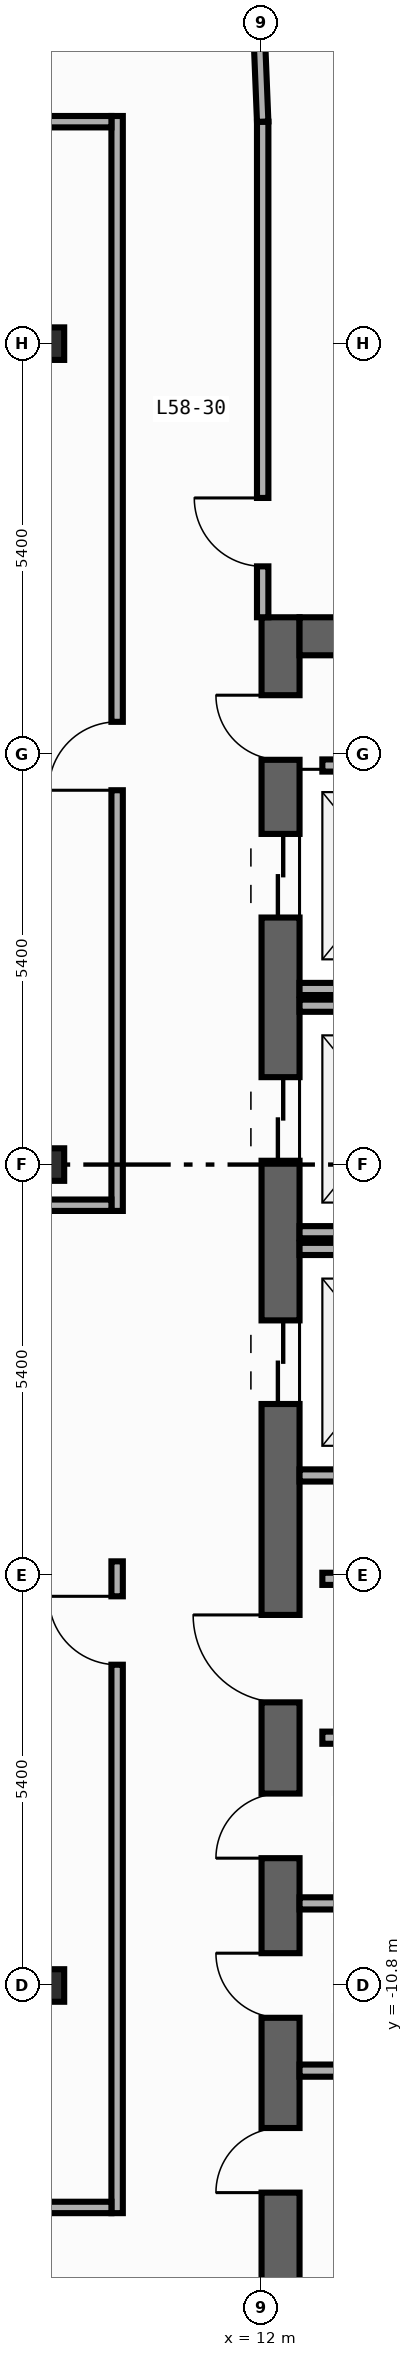
"""IFC4 building model, lengths in metres.
Left out: names, types, materials, properties, quantities, classifications, styles, units other than length and angle.
Written with IfcOpenShell. Run it as: python <this file> out.ifc"""

import sys

from ifc_helpers import new_model, si_unit, direction, frame, frame_2d, origin, origin_2d, place, context, subcontext, project, spatial, rectangle, i_section, extrude, element, fill, save


model = new_model("IFC4")
c1 = context("Model", 3, precision=1e-05, world=origin(), true_north=direction((0.0, 1.0)))
c2 = subcontext(c1, "Body", "Model", "MODEL_VIEW")
j1 = project(units=[si_unit("LENGTHUNIT", "METRE"), si_unit("PLANEANGLEUNIT", "RADIAN")], contexts=[c1])
p1 = place(None, origin())
s1 = spatial("IfcSite", under=j1, at=p1, CompositionType="ELEMENT")
p2 = place(p1, origin())
s2 = spatial("IfcBuilding", under=s1, at=p2, CompositionType="ELEMENT")
p3 = place(p2, frame((0.0, 0.0, 247.6)))
s3 = spatial("IfcBuildingStorey", under=s2, at=p3, CompositionType="ELEMENT", Elevation=247.6)
p4 = place(p3, frame((12.25, -19.8, 0.0), z_axis=(0.0, 0.0, 1.0), x_axis=(0.0, 1.0, 0.0)))
e1 = element("IfcWall", 1, at=p4, inside=s3, PredefinedType="SHEAR", context=c2, shape_type="SweptSolid", body=[
    extrude(rectangle(XDim=27.0, YDim=0.5, at=frame_2d((13.5, 0.0))), origin(), (0.0, 0.0, 1.0), 3.34),
])
p5 = place(p4, frame((23.05, 0.0, 0.0)))
e2 = element("IfcOpeningElement", 2, at=p5, cuts=e1, PredefinedType="OPENING", context=c2, shape_type="SweptSolid", body=[
    extrude(rectangle(XDim=1.1, YDim=2.2, at=frame_2d((0.55, 1.1))), frame((0.0, 0.26, 0.0), z_axis=(0.0, -1.0, 0.0), x_axis=(1.0, 0.0, 0.0)), (0.0, 0.0, 1.0), 0.52),
])
p6 = place(p4, frame((19.85, 0.0, 0.0)))
e3 = element("IfcOpeningElement", 3, at=p6, cuts=e1, PredefinedType="OPENING", context=c2, shape_type="SweptSolid", body=[
    extrude(rectangle(XDim=1.1, YDim=2.2, at=frame_2d((0.55, 1.1))), frame((0.0, 0.26, 0.0), z_axis=(0.0, -1.0, 0.0), x_axis=(1.0, 0.0, 0.0)), (0.0, 0.0, 1.0), 0.52),
])
p7 = place(p4, frame((16.65, 0.0, 0.0)))
e4 = element("IfcOpeningElement", 4, at=p7, cuts=e1, PredefinedType="OPENING", context=c2, shape_type="SweptSolid", body=[
    extrude(rectangle(XDim=1.1, YDim=2.2, at=frame_2d((0.55, 1.1))), frame((0.0, 0.26, 0.0), z_axis=(0.0, -1.0, 0.0), x_axis=(1.0, 0.0, 0.0)), (0.0, 0.0, 1.0), 0.52),
])
p8 = place(p4, frame((6.275, 0.0, 0.0)))
e5 = element("IfcOpeningElement", 5, at=p8, cuts=e1, PredefinedType="OPENING", context=c2, shape_type="SweptSolid", body=[
    extrude(rectangle(XDim=0.85, YDim=2.1, at=frame_2d((0.425, 1.05))), frame((0.0, 0.26, 0.0), z_axis=(0.0, -1.0, 0.0), x_axis=(1.0, 0.0, 0.0)), (0.0, 0.0, 1.0), 0.52),
])
p9 = place(p4, frame((8.575, 0.0, 0.0)))
e6 = element("IfcOpeningElement", 6, at=p9, cuts=e1, PredefinedType="OPENING", context=c2, shape_type="SweptSolid", body=[
    extrude(rectangle(XDim=0.85, YDim=2.1, at=frame_2d((0.425, 1.05))), frame((0.0, 0.26, 0.0), z_axis=(0.0, -1.0, 0.0), x_axis=(1.0, 0.0, 0.0)), (0.0, 0.0, 1.0), 0.52),
])
p10 = place(p4, frame((10.675, 0.0, 0.0)))
e7 = element("IfcOpeningElement", 7, at=p10, cuts=e1, PredefinedType="OPENING", context=c2, shape_type="SweptSolid", body=[
    extrude(rectangle(XDim=0.85, YDim=2.1, at=frame_2d((0.425, 1.05))), frame((0.0, 0.26, 0.0), z_axis=(0.0, -1.0, 0.0), x_axis=(1.0, 0.0, 0.0)), (0.0, 0.0, 1.0), 0.52),
])
p11 = place(p4, frame((12.725, 0.0, 0.0)))
e8 = element("IfcOpeningElement", 8, at=p11, cuts=e1, PredefinedType="OPENING", context=c2, shape_type="SweptSolid", body=[
    extrude(rectangle(XDim=1.15, YDim=2.2, at=frame_2d((0.575, 1.1))), frame((0.0, 0.26, 0.0), z_axis=(0.0, -1.0, 0.0), x_axis=(1.0, 0.0, 0.0)), (0.0, 0.0, 1.0), 0.52),
])
p12 = place(p4, frame((25.125, 0.0, 0.0)))
e9 = element("IfcOpeningElement", 9, at=p12, cuts=e1, PredefinedType="OPENING", context=c2, shape_type="SweptSolid", body=[
    extrude(rectangle(XDim=0.85, YDim=2.1, at=frame_2d((0.425, 1.05))), frame((0.0, 0.26, 0.0), z_axis=(0.0, -1.0, 0.0), x_axis=(1.0, 0.0, 0.0)), (0.0, 0.0, 1.0), 0.52),
])
p13 = place(p3, frame((12.5, 6.95, 0.0), z_axis=(0.0, 0.0, 1.0), x_axis=(1.0, 0.0, 0.0)))
e10 = element("IfcWall", 10, at=p13, inside=s3, PredefinedType="SHEAR", context=c2, shape_type="SweptSolid", body=[
    extrude(rectangle(XDim=7.4, YDim=0.5, at=frame_2d((3.7, 0.0))), origin(), (0.0, 0.0, 1.0), 3.34),
])
for number, where, z_axis, x_axis in (
    (11, (9.2, -10.8, 0.0), (0.0, 0.0, 1.0), (1.0, 0.0, 0.0)),
    (12, (9.2, 0.0, 0.0), (0.0, 0.0, 1.0), (1.0, 0.0, 0.0)),
    (13, (9.2, 10.8, 0.0), (0.0, 0.0, 1.0), (1.0, 0.0, 0.0)),
):
    element("IfcColumn", number, at=place(p3, frame(where, z_axis=z_axis, x_axis=x_axis)), inside=s3, PredefinedType="COLUMN", context=c2, shape_type="SweptSolid", body=[
        extrude(i_section(OverallWidth=0.407, OverallDepth=0.428, WebThickness=0.02, FlangeThickness=0.035, FilletRadius=0.022, at=origin_2d()), origin(), (0.0, 0.0, 1.0), 3.6),
    ])
for number, where, z_axis, x_axis in (
    (14, (12.5, 2.31, 0.0), (0.0, 0.0, 1.0), (1.0, 0.0, 0.0)),
    (15, (12.5, -0.89, 0.0), (0.0, 0.0, 1.0), (1.0, 0.0, 0.0)),
    (16, (12.5, 2.09, 0.0), (0.0, 0.0, 1.0), (1.0, 0.0, 0.0)),
    (17, (12.5, -4.09, 0.0), (0.0, 0.0, 1.0), (1.0, 0.0, 0.0)),
    (18, (12.5, -1.11, 0.0), (0.0, 0.0, 1.0), (1.0, 0.0, 0.0)),
):
    element("IfcWall", number, at=place(p3, frame(where, z_axis=z_axis, x_axis=x_axis)), inside=s3, PredefinedType="STANDARD", context=c2, shape_type="SweptSolid", body=[
        extrude(rectangle(XDim=2.49, YDim=0.16, at=frame_2d((1.245, 0.0))), origin(), (0.0, 0.0, 1.0), 3.34),
    ])
for number, where, z_axis, x_axis in (
    (19, (12.8, -5.45, 0.0), (0.0, 0.0, 1.0), (1.0, 0.0, 0.0)),
    (20, (12.8, -7.54, 0.0), (0.0, 0.0, 1.0), (1.0, 0.0, 0.0)),
    (21, (12.8, 5.25, 0.0), (0.0, 0.0, 1.0), (1.0, 0.0, 0.0)),
):
    element("IfcWall", number, at=place(p3, frame(where, z_axis=z_axis, x_axis=x_axis)), inside=s3, PredefinedType="STANDARD", context=c2, shape_type="SweptSolid", body=[
        extrude(rectangle(XDim=2.6, YDim=0.16, at=frame_2d((1.3, 0.0))), origin(), (0.0, 0.0, 1.0), 3.34),
    ])
for number, where, z_axis, x_axis in (
    (22, (12.5, -11.92, 0.0), (0.0, 0.0, 1.0), (1.0, 0.0, 0.0)),
    (23, (12.5, -9.72, 0.0), (0.0, 0.0, 1.0), (1.0, 0.0, 0.0)),
):
    element("IfcWall", number, at=place(p3, frame(where, z_axis=z_axis, x_axis=x_axis)), inside=s3, PredefinedType="PARTITIONING", context=c2, shape_type="SweptSolid", body=[
        extrude(rectangle(XDim=2.9, YDim=0.16, at=frame_2d((1.45, 0.0))), origin(), (0.0, 0.0, 1.0), 3.34),
    ])
p14 = place(p3, frame((12.015, 7.2, 0.0), z_axis=(0.0, 0.0, 1.0), x_axis=(0.0, 1.0, 0.0)))
e24 = element("IfcWall", 24, at=p14, inside=s3, PredefinedType="PARTITIONING", context=c2, shape_type="SweptSolid", body=[
    extrude(rectangle(XDim=6.52, YDim=0.15, at=frame_2d((3.26, 0.0))), origin(), (0.0, 0.0, 1.0), 3.34),
])
p15 = place(p14, frame((0.67, 0.0, 0.0)))
e25 = element("IfcOpeningElement", 25, at=p15, cuts=e24, PredefinedType="OPENING", context=c2, shape_type="SweptSolid", body=[
    extrude(rectangle(XDim=0.9, YDim=2.15, at=frame_2d((0.45, 1.075))), frame((0.0, 0.085, 0.0), z_axis=(0.0, -1.0, 0.0), x_axis=(1.0, 0.0, 0.0)), (0.0, 0.0, 1.0), 0.17),
])
p16 = place(p3, frame((10.1, -0.61, 0.0), z_axis=(0.0, 0.0, 1.0), x_axis=(0.0, 1.0, 0.0)))
e26 = element("IfcWall", 26, at=p16, inside=s3, PredefinedType="PARTITIONING", context=c2, shape_type="SweptSolid", body=[
    extrude(rectangle(XDim=14.405, YDim=0.15, at=frame_2d((7.203, 0.0))), origin(), (0.0, 0.0, 1.0), 3.34),
])
p17 = place(p16, frame((5.535, 0.0, 0.0)))
e27 = element("IfcOpeningElement", 27, at=p17, cuts=e26, PredefinedType="OPENING", context=c2, shape_type="SweptSolid", body=[
    extrude(rectangle(XDim=0.9, YDim=2.15, at=frame_2d((0.45, 1.075))), frame((0.0, 0.085, 0.0), z_axis=(0.0, -1.0, 0.0), x_axis=(1.0, 0.0, 0.0)), (0.0, 0.0, 1.0), 0.17),
])
p18 = place(p3, frame((10.1, -13.795, 0.0), z_axis=(0.0, 0.0, 1.0), x_axis=(0.0, 1.0, 0.0)))
e28 = element("IfcWall", 28, at=p18, inside=s3, PredefinedType="PARTITIONING", context=c2, shape_type="SweptSolid", body=[
    extrude(rectangle(XDim=8.575, YDim=0.15, at=frame_2d((4.288, 0.0))), origin(), (0.0, 0.0, 1.0), 3.34),
])
p19 = place(p18, frame((7.215, 0.0, 0.0)))
e29 = element("IfcOpeningElement", 29, at=p19, cuts=e28, PredefinedType="OPENING", context=c2, shape_type="SweptSolid", body=[
    extrude(rectangle(XDim=0.9, YDim=2.15, at=frame_2d((0.45, 1.075))), frame((0.0, 0.085, 0.0), z_axis=(0.0, -1.0, 0.0), x_axis=(1.0, 0.0, 0.0)), (0.0, 0.0, 1.0), 0.17),
])
p20 = place(p3, frame((-0.21, -0.535, 0.0), z_axis=(0.0, 0.0, 1.0), x_axis=(1.0, 0.0, 0.0)))
e30 = element("IfcWall", 30, at=p20, inside=s3, PredefinedType="PARTITIONING", context=c2, shape_type="SweptSolid", body=[
    extrude(rectangle(XDim=10.235, YDim=0.15, at=frame_2d((5.117, 0.0))), origin(), (0.0, 0.0, 1.0), 3.34),
])
p21 = place(p20, frame((0.46, 0.0, 0.0)))
e31 = element("IfcOpeningElement", 31, at=p21, cuts=e30, PredefinedType="OPENING", context=c2, shape_type="SweptSolid", body=[
    extrude(rectangle(XDim=0.9, YDim=2.15, at=frame_2d((0.45, 1.075))), frame((0.0, 0.085, 0.0), z_axis=(0.0, -1.0, 0.0), x_axis=(1.0, 0.0, 0.0)), (0.0, 0.0, 1.0), 0.17),
])
p22 = place(p3, frame((12.015, 13.72, 0.0), z_axis=(0.0, 0.0, 1.0), x_axis=(-0.040046877756, 0.99919780203, 0.0)))
e32 = element("IfcWall", 32, at=p22, inside=s3, PredefinedType="PARTITIONING", context=c2, shape_type="SweptSolid", body=[
    extrude(rectangle(XDim=1.731, YDim=0.15, at=frame_2d((0.866, 0.0))), origin(), (0.0, 0.0, 1.0), 3.34),
])
p23 = place(p3, frame((-0.06, 13.72, 0.0), z_axis=(0.0, 0.0, 1.0), x_axis=(1.0, 0.0, 0.0)))
e33 = element("IfcWall", 33, at=p23, inside=s3, PredefinedType="PARTITIONING", context=c2, shape_type="SweptSolid", body=[
    extrude(rectangle(XDim=10.085, YDim=0.15, at=frame_2d((5.042, 0.0))), origin(), (0.0, 0.0, 1.0), 3.34),
])
p24 = place(p23, frame((1.871, 0.0, 0.0)))
e34 = element("IfcOpeningElement", 34, at=p24, cuts=e33, PredefinedType="OPENING", context=c2, shape_type="SweptSolid", body=[
    extrude(rectangle(XDim=0.9, YDim=2.15, at=frame_2d((0.45, 1.075))), frame((0.0, 0.085, 0.0), z_axis=(0.0, -1.0, 0.0), x_axis=(1.0, 0.0, 0.0)), (0.0, 0.0, 1.0), 0.17),
])
p25 = place(p3, frame((-0.23, -13.72, 0.0), z_axis=(0.0, 0.0, 1.0), x_axis=(1.0, 0.0, 0.0)))
e35 = element("IfcWall", 35, at=p25, inside=s3, PredefinedType="PARTITIONING", context=c2, shape_type="SweptSolid", body=[
    extrude(rectangle(XDim=10.255, YDim=0.15, at=frame_2d((5.127, 0.0))), origin(), (0.0, 0.0, 1.0), 3.34),
])
p26 = place(p25, frame((2.067, 0.0, 0.0)))
e36 = element("IfcOpeningElement", 36, at=p26, cuts=e35, PredefinedType="OPENING", context=c2, shape_type="SweptSolid", body=[
    extrude(rectangle(XDim=0.9, YDim=2.15, at=frame_2d((0.45, 1.075))), frame((0.0, 0.085, 0.0), z_axis=(0.0, -1.0, 0.0), x_axis=(1.0, 0.0, 0.0)), (0.0, 0.0, 1.0), 0.17),
])
p27 = place(p5, origin())
e37 = element("IfcDoor", 37, at=p27, inside=s3, OperationType="DOUBLE_DOOR_SLIDING", PredefinedType="DOOR", context=c2, shape_type="SweptSolid", body=[
    extrude(rectangle(XDim=1.1, YDim=2.2, at=frame_2d((0.55, 1.1))), frame((0.0, 0.025, 0.0), z_axis=(0.0, -1.0, 0.0), x_axis=(1.0, 0.0, 0.0)), (0.0, 0.0, 1.0), 0.05),
])
fill(e2, e37)
p28 = place(p6, origin())
e38 = element("IfcDoor", 38, at=p28, inside=s3, OperationType="DOUBLE_DOOR_SLIDING", PredefinedType="DOOR", context=c2, shape_type="SweptSolid", body=[
    extrude(rectangle(XDim=1.1, YDim=2.2, at=frame_2d((0.55, 1.1))), frame((0.0, 0.025, 0.0), z_axis=(0.0, -1.0, 0.0), x_axis=(1.0, 0.0, 0.0)), (0.0, 0.0, 1.0), 0.05),
])
fill(e3, e38)
p29 = place(p7, origin())
e39 = element("IfcDoor", 39, at=p29, inside=s3, OperationType="DOUBLE_DOOR_SLIDING", PredefinedType="DOOR", context=c2, shape_type="SweptSolid", body=[
    extrude(rectangle(XDim=1.1, YDim=2.2, at=frame_2d((0.55, 1.1))), frame((0.0, 0.025, 0.0), z_axis=(0.0, -1.0, 0.0), x_axis=(1.0, 0.0, 0.0)), (0.0, 0.0, 1.0), 0.05),
])
fill(e4, e39)
p30 = place(p8, origin())
e40 = element("IfcDoor", 40, at=p30, inside=s3, OperationType="SINGLE_SWING_LEFT", PredefinedType="DOOR", context=c2, shape_type="SweptSolid", body=[
    extrude(rectangle(XDim=0.85, YDim=2.1, at=frame_2d((0.425, 1.05))), frame((0.0, 0.025, 0.0), z_axis=(0.0, -1.0, 0.0), x_axis=(1.0, 0.0, 0.0)), (0.0, 0.0, 1.0), 0.05),
])
fill(e5, e40)
p31 = place(p9, origin())
e41 = element("IfcDoor", 41, at=p31, inside=s3, OperationType="SINGLE_SWING_RIGHT", PredefinedType="DOOR", context=c2, shape_type="SweptSolid", body=[
    extrude(rectangle(XDim=0.85, YDim=2.1, at=frame_2d((0.425, 1.05))), frame((0.0, 0.025, 0.0), z_axis=(0.0, -1.0, 0.0), x_axis=(1.0, 0.0, 0.0)), (0.0, 0.0, 1.0), 0.05),
])
fill(e6, e41)
p32 = place(p10, origin())
e42 = element("IfcDoor", 42, at=p32, inside=s3, OperationType="SINGLE_SWING_LEFT", PredefinedType="DOOR", context=c2, shape_type="SweptSolid", body=[
    extrude(rectangle(XDim=0.85, YDim=2.1, at=frame_2d((0.425, 1.05))), frame((0.0, 0.025, 0.0), z_axis=(0.0, -1.0, 0.0), x_axis=(1.0, 0.0, 0.0)), (0.0, 0.0, 1.0), 0.05),
])
fill(e7, e42)
p33 = place(p11, origin())
e43 = element("IfcDoor", 43, at=p33, inside=s3, OperationType="SINGLE_SWING_RIGHT", PredefinedType="DOOR", context=c2, shape_type="SweptSolid", body=[
    extrude(rectangle(XDim=1.15, YDim=2.2, at=frame_2d((0.575, 1.1))), frame((0.0, 0.025, 0.0), z_axis=(0.0, -1.0, 0.0), x_axis=(1.0, 0.0, 0.0)), (0.0, 0.0, 1.0), 0.05),
])
fill(e8, e43)
p34 = place(p12, origin())
e44 = element("IfcDoor", 44, at=p34, inside=s3, OperationType="SINGLE_SWING_RIGHT", PredefinedType="DOOR", context=c2, shape_type="SweptSolid", body=[
    extrude(rectangle(XDim=0.85, YDim=2.1, at=frame_2d((0.425, 1.05))), frame((0.0, 0.025, 0.0), z_axis=(0.0, -1.0, 0.0), x_axis=(1.0, 0.0, 0.0)), (0.0, 0.0, 1.0), 0.05),
])
fill(e9, e44)
p35 = place(p15, origin())
e45 = element("IfcDoor", 45, at=p35, inside=s3, OperationType="SINGLE_SWING_RIGHT", PredefinedType="DOOR", context=c2, shape_type="SweptSolid", body=[
    extrude(rectangle(XDim=0.9, YDim=2.15, at=frame_2d((0.45, 1.075))), frame((0.0, 0.025, 0.0), z_axis=(0.0, -1.0, 0.0), x_axis=(1.0, 0.0, 0.0)), (0.0, 0.0, 1.0), 0.05),
])
fill(e25, e45)
p36 = place(p17, origin())
e46 = element("IfcDoor", 46, at=p36, inside=s3, OperationType="SINGLE_SWING_LEFT", PredefinedType="DOOR", context=c2, shape_type="SweptSolid", body=[
    extrude(rectangle(XDim=0.9, YDim=2.15, at=frame_2d((0.45, 1.075))), frame((0.0, 0.025, 0.0), z_axis=(0.0, -1.0, 0.0), x_axis=(1.0, 0.0, 0.0)), (0.0, 0.0, 1.0), 0.05),
])
fill(e27, e46)
p37 = place(p19, origin())
e47 = element("IfcDoor", 47, at=p37, inside=s3, OperationType="SINGLE_SWING_RIGHT", PredefinedType="DOOR", context=c2, shape_type="SweptSolid", body=[
    extrude(rectangle(XDim=0.9, YDim=2.15, at=frame_2d((0.45, 1.075))), frame((0.0, 0.025, 0.0), z_axis=(0.0, -1.0, 0.0), x_axis=(1.0, 0.0, 0.0)), (0.0, 0.0, 1.0), 0.05),
])
fill(e29, e47)
save(model, sys.argv[1])
